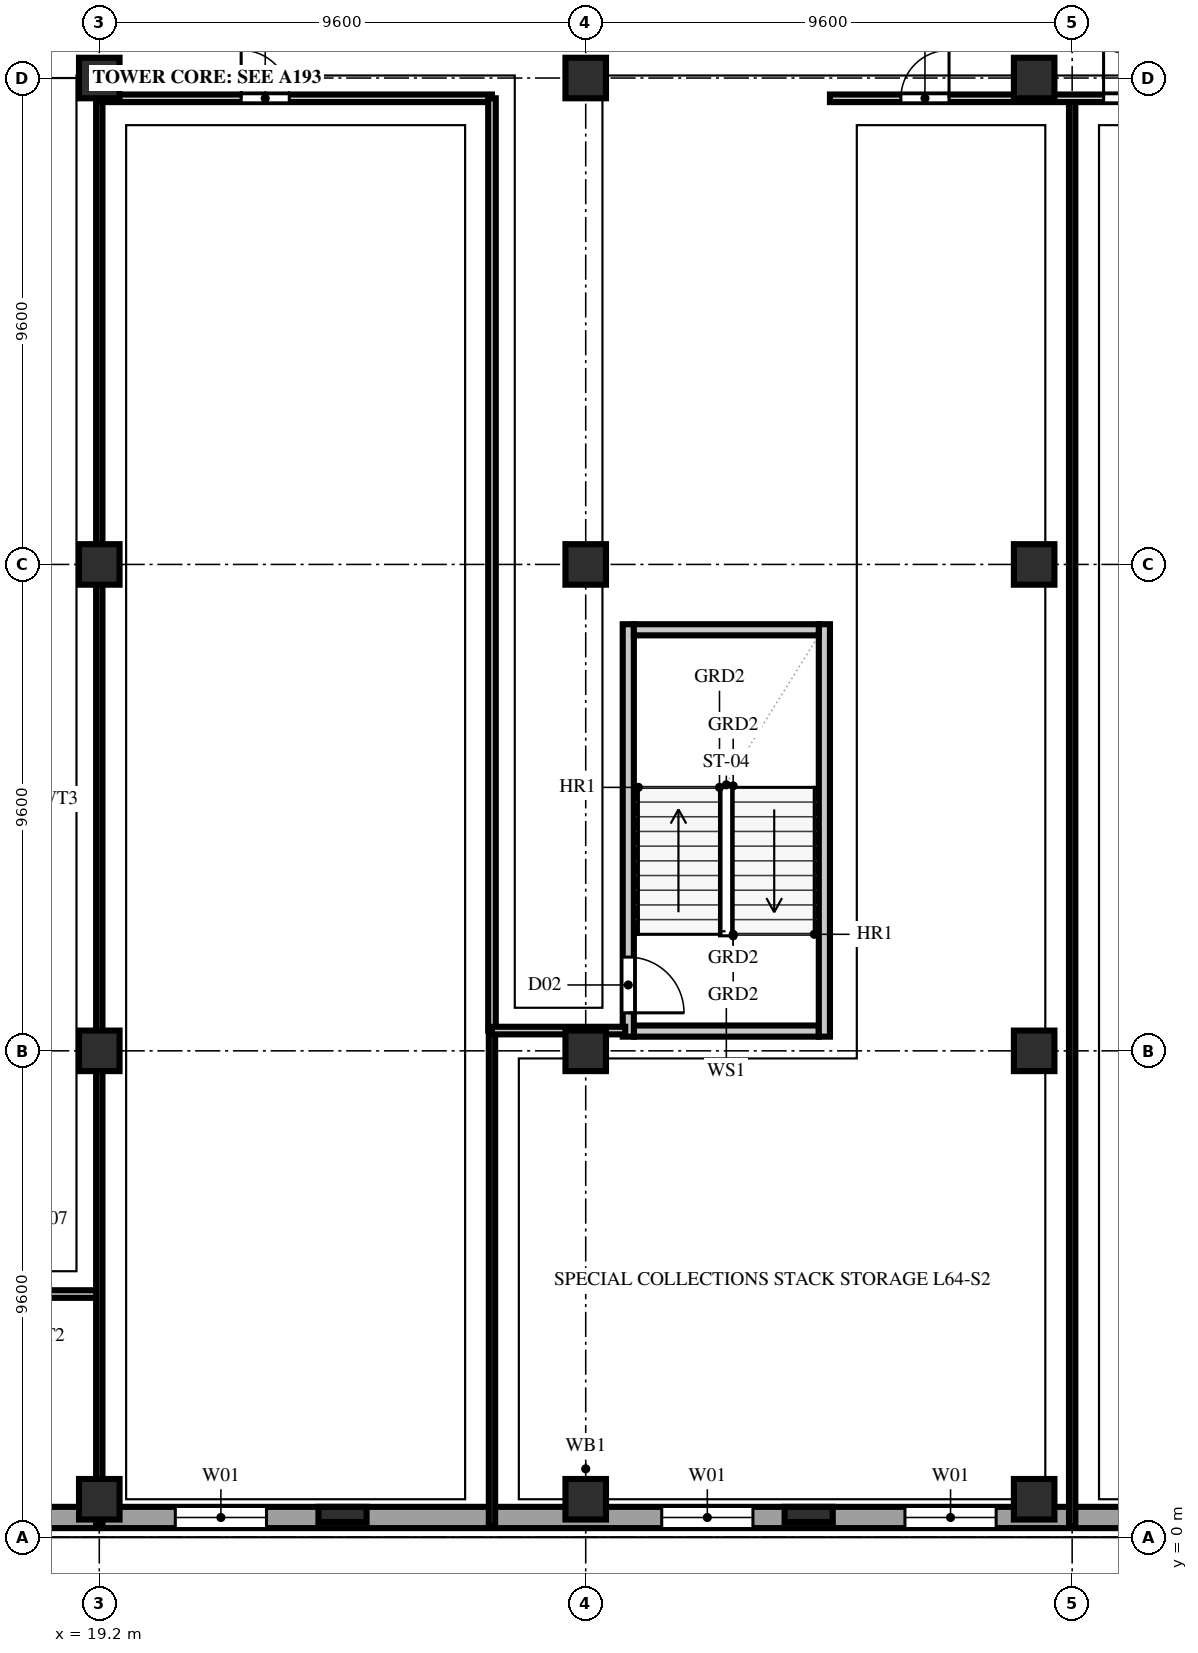
"""IFC4 building model, lengths in metres.
Left out: names, types, materials, properties, quantities, classifications, styles, units other than length and angle.
Written with IfcOpenShell. Run it as: python <this file> out.ifc"""

import sys

from ifc_helpers import new_model, si_unit, direction, frame, frame_2d, origin, origin_2d, place, context, subcontext, project, spatial, rectangle, extrude, element, fill, save


model = new_model("IFC4")
c1 = context("Model", 3, precision=1e-05, world=origin(), true_north=direction((0.0, 1.0)))
c2 = subcontext(c1, "Body", "Model", "MODEL_VIEW")
j1 = project(units=[si_unit("LENGTHUNIT", "METRE"), si_unit("PLANEANGLEUNIT", "RADIAN")], contexts=[c1])
p1 = place(None, origin())
s1 = spatial("IfcSite", under=j1, at=p1, CompositionType="ELEMENT")
p2 = place(p1, origin())
s2 = spatial("IfcBuilding", under=s1, at=p2, CompositionType="ELEMENT")
p3 = place(p2, frame((0.0, 0.0, 252.2)))
s3 = spatial("IfcBuildingStorey", under=s2, at=p3, CompositionType="ELEMENT", Elevation=252.2)
for number, where, z_axis, x_axis in (
    (1, (19.2, 0.75, 0.0), (0.0, 0.0, 1.0), (1.0, 0.0, 0.0)),
    (2, (19.2, 9.6, 0.0), (0.0, 0.0, 1.0), (1.0, 0.0, 0.0)),
    (3, (19.2, 19.2, 0.0), (0.0, 0.0, 1.0), (1.0, 0.0, 0.0)),
    (4, (19.2, 28.8, 0.0), (0.0, 0.0, 1.0), (1.0, 0.0, 0.0)),
    (5, (28.8, 0.75, 0.0), (0.0, 0.0, 1.0), (1.0, 0.0, 0.0)),
    (6, (28.8, 9.6, 0.0), (0.0, 0.0, 1.0), (1.0, 0.0, 0.0)),
    (7, (28.8, 19.2, 0.0), (0.0, 0.0, 1.0), (1.0, 0.0, 0.0)),
    (8, (28.8, 28.8, 0.0), (0.0, 0.0, 1.0), (1.0, 0.0, 0.0)),
    (9, (37.65, 0.75, 0.0), (0.0, 0.0, 1.0), (1.0, 0.0, 0.0)),
    (10, (37.65, 9.6, 0.0), (0.0, 0.0, 1.0), (1.0, 0.0, 0.0)),
    (11, (37.65, 19.2, 0.0), (0.0, 0.0, 1.0), (1.0, 0.0, 0.0)),
    (12, (37.65, 28.8, 0.0), (0.0, 0.0, 1.0), (1.0, 0.0, 0.0)),
):
    element("IfcColumn", number, at=place(p3, frame(where, z_axis=z_axis, x_axis=x_axis)), inside=s3, PredefinedType="COLUMN", context=c2, shape_type="SweptSolid", body=[
        extrude(rectangle(XDim=0.8, YDim=0.8, at=origin_2d()), origin(), (0.0, 0.0, 1.0), 3.8),
    ])
for number, where, z_axis, x_axis in (
    (13, (24.0, 0.45, 0.0), (0.0, 0.0, 1.0), (1.0, 0.0, 0.0)),
    (14, (33.2, 0.45, 0.0), (0.0, 0.0, 1.0), (1.0, 0.0, 0.0)),
):
    element("IfcColumn", number, at=place(p3, frame(where, z_axis=z_axis, x_axis=x_axis)), inside=s3, PredefinedType="PILASTER", context=c2, shape_type="SweptSolid", body=[
        extrude(rectangle(XDim=0.95, YDim=0.3, at=origin_2d()), origin(), (0.0, 0.0, 1.0), 3.8),
    ])
p4 = place(p3, frame((1.84, 0.39, 0.0), z_axis=(0.0, 0.0, 1.0), x_axis=(1.0, 0.0, 0.0)))
e15 = element("IfcWall", 15, at=p4, inside=s3, PredefinedType="SOLIDWALL", context=c2, shape_type="SweptSolid", body=[
    extrude(rectangle(XDim=53.92, YDim=0.42, at=frame_2d((26.96, 0.0))), origin(), (0.0, 0.0, 1.0), 3.48),
])
p5 = place(p4, frame((4.46, 0.0, 0.85)))
e16 = element("IfcOpeningElement", 16, at=p5, cuts=e15, PredefinedType="OPENING", context=c2, shape_type="SweptSolid", body=[
    extrude(rectangle(XDim=1.8, YDim=1.85, at=frame_2d((0.9, 0.925))), frame((0.0, 0.222, 0.0), z_axis=(0.0, -1.0, 0.0), x_axis=(1.0, 0.0, 0.0)), (0.0, 0.0, 1.0), 0.444),
])
p6 = place(p4, frame((9.26, 0.0, 0.85)))
e17 = element("IfcOpeningElement", 17, at=p6, cuts=e15, PredefinedType="OPENING", context=c2, shape_type="SweptSolid", body=[
    extrude(rectangle(XDim=1.8, YDim=1.85, at=frame_2d((0.9, 0.925))), frame((0.0, 0.222, 0.0), z_axis=(0.0, -1.0, 0.0), x_axis=(1.0, 0.0, 0.0)), (0.0, 0.0, 1.0), 0.444),
])
p7 = place(p4, frame((18.86, 0.0, 0.85)))
e18 = element("IfcOpeningElement", 18, at=p7, cuts=e15, PredefinedType="OPENING", context=c2, shape_type="SweptSolid", body=[
    extrude(rectangle(XDim=1.8, YDim=1.85, at=frame_2d((0.9, 0.925))), frame((0.0, 0.222, 0.0), z_axis=(0.0, -1.0, 0.0), x_axis=(1.0, 0.0, 0.0)), (0.0, 0.0, 1.0), 0.444),
])
p8 = place(p4, frame((28.46, 0.0, 0.85)))
e19 = element("IfcOpeningElement", 19, at=p8, cuts=e15, PredefinedType="OPENING", context=c2, shape_type="SweptSolid", body=[
    extrude(rectangle(XDim=1.8, YDim=1.85, at=frame_2d((0.9, 0.925))), frame((0.0, 0.222, 0.0), z_axis=(0.0, -1.0, 0.0), x_axis=(1.0, 0.0, 0.0)), (0.0, 0.0, 1.0), 0.444),
])
p9 = place(p4, frame((33.26, 0.0, 0.85)))
e20 = element("IfcOpeningElement", 20, at=p9, cuts=e15, PredefinedType="OPENING", context=c2, shape_type="SweptSolid", body=[
    extrude(rectangle(XDim=1.8, YDim=1.85, at=frame_2d((0.9, 0.925))), frame((0.0, 0.222, 0.0), z_axis=(0.0, -1.0, 0.0), x_axis=(1.0, 0.0, 0.0)), (0.0, 0.0, 1.0), 0.444),
])
p10 = place(p4, frame((38.06, 0.0, 0.85)))
e21 = element("IfcOpeningElement", 21, at=p10, cuts=e15, PredefinedType="OPENING", context=c2, shape_type="SweptSolid", body=[
    extrude(rectangle(XDim=1.8, YDim=1.85, at=frame_2d((0.9, 0.925))), frame((0.0, 0.222, 0.0), z_axis=(0.0, -1.0, 0.0), x_axis=(1.0, 0.0, 0.0)), (0.0, 0.0, 1.0), 0.444),
])
p11 = place(p4, frame((42.86, 0.0, 0.85)))
e22 = element("IfcOpeningElement", 22, at=p11, cuts=e15, PredefinedType="OPENING", context=c2, shape_type="SweptSolid", body=[
    extrude(rectangle(XDim=1.8, YDim=1.85, at=frame_2d((0.9, 0.925))), frame((0.0, 0.222, 0.0), z_axis=(0.0, -1.0, 0.0), x_axis=(1.0, 0.0, 0.0)), (0.0, 0.0, 1.0), 0.444),
])
p12 = place(p4, frame((47.66, 0.0, 0.85)))
e23 = element("IfcOpeningElement", 23, at=p12, cuts=e15, PredefinedType="OPENING", context=c2, shape_type="SweptSolid", body=[
    extrude(rectangle(XDim=1.8, YDim=1.85, at=frame_2d((0.9, 0.925))), frame((0.0, 0.222, 0.0), z_axis=(0.0, -1.0, 0.0), x_axis=(1.0, 0.0, 0.0)), (0.0, 0.0, 1.0), 0.444),
])
p13 = place(p3, frame((29.75, 9.99, 0.0), z_axis=(0.0, 0.0, 1.0), x_axis=(1.0, 0.0, 0.0)))
e24 = element("IfcWall", 24, at=p13, inside=s3, PredefinedType="SOLIDWALL", context=c2, shape_type="SweptSolid", body=[
    extrude(rectangle(XDim=3.65, YDim=0.22, at=frame_2d((1.825, 0.0))), origin(), (0.0, 0.0, 1.0), 3.48),
])
p14 = place(p3, frame((29.64, 9.88, 0.0), z_axis=(0.0, 0.0, 1.0), x_axis=(0.0, 1.0, 0.0)))
e25 = element("IfcWall", 25, at=p14, inside=s3, PredefinedType="SOLIDWALL", context=c2, shape_type="SweptSolid", body=[
    extrude(rectangle(XDim=8.14, YDim=0.22, at=frame_2d((4.07, 0.0))), origin(), (0.0, 0.0, 1.0), 3.48),
])
p15 = place(p14, frame((0.47, 0.0, 0.0)))
e26 = element("IfcOpeningElement", 26, at=p15, cuts=e25, PredefinedType="OPENING", context=c2, shape_type="SweptSolid", body=[
    extrude(rectangle(XDim=1.1, YDim=2.2, at=frame_2d((0.55, 1.1))), frame((0.0, 0.122, 0.0), z_axis=(0.0, -1.0, 0.0), x_axis=(1.0, 0.0, 0.0)), (0.0, 0.0, 1.0), 0.244),
])
p16 = place(p3, frame((33.51, 9.88, 0.0), z_axis=(0.0, 0.0, 1.0), x_axis=(0.0, 1.0, 0.0)))
e27 = element("IfcWall", 27, at=p16, inside=s3, PredefinedType="SOLIDWALL", context=c2, shape_type="SweptSolid", body=[
    extrude(rectangle(XDim=8.14, YDim=0.22, at=frame_2d((4.07, 0.0))), origin(), (0.0, 0.0, 1.0), 3.48),
])
p17 = place(p3, frame((29.75, 17.91, 0.0), z_axis=(0.0, 0.0, 1.0), x_axis=(1.0, 0.0, 0.0)))
e28 = element("IfcWall", 28, at=p17, inside=s3, PredefinedType="SOLIDWALL", context=c2, shape_type="SweptSolid", body=[
    extrude(rectangle(XDim=3.65, YDim=0.22, at=frame_2d((1.825, 0.0))), origin(), (0.0, 0.0, 1.0), 3.48),
])
p18 = place(p3, frame((17.05, 4.8, 0.0), z_axis=(0.0, 0.0, 1.0), x_axis=(1.0, 0.0, 0.0)))
e29 = element("IfcWall", 29, at=p18, inside=s3, PredefinedType="PARTITIONING", context=c2, shape_type="SweptSolid", body=[
    extrude(rectangle(XDim=2.15, YDim=0.15, at=frame_2d((1.075, 0.0))), origin(), (0.0, 0.0, 1.0), 3.48),
])
p19 = place(p3, frame((19.2, 0.22, 0.0), z_axis=(0.0, 0.0, 1.0), x_axis=(0.0, 1.0, 0.0)))
e30 = element("IfcWall", 30, at=p19, inside=s3, PredefinedType="PARTITIONING", context=c2, shape_type="SweptSolid", body=[
    extrude(rectangle(XDim=0.53, YDim=0.125, at=frame_2d((0.265, 0.0))), origin(), (0.0, 0.0, 1.0), 3.48),
])
p20 = place(p3, frame((19.2, 0.75, 0.0), z_axis=(0.0, 0.0, 1.0), x_axis=(0.0, 1.0, 0.0)))
e31 = element("IfcWall", 31, at=p20, inside=s3, PredefinedType="PARTITIONING", context=c2, shape_type="SweptSolid", body=[
    extrude(rectangle(XDim=27.65, YDim=0.125, at=frame_2d((13.825, 0.0))), origin(), (0.0, 0.0, 1.0), 2.863),
])
p21 = place(p3, frame((19.2, 28.4, 0.0), z_axis=(0.0, 0.0, 1.0), x_axis=(1.0, 0.0, 0.0)))
e32 = element("IfcWall", 32, at=p21, inside=s3, PredefinedType="PARTITIONING", context=c2, shape_type="SweptSolid", body=[
    extrude(rectangle(XDim=7.75, YDim=0.15, at=frame_2d((3.875, 0.0))), origin(), (0.0, 0.0, 1.0), 3.48),
])
p22 = place(p21, frame((2.8, 0.0, 0.0)))
e33 = element("IfcOpeningElement", 33, at=p22, cuts=e32, PredefinedType="OPENING", context=c2, shape_type="SweptSolid", body=[
    extrude(rectangle(XDim=0.95, YDim=2.15, at=frame_2d((0.475, 1.075))), frame((0.0, 0.087, 0.0), z_axis=(0.0, -1.0, 0.0), x_axis=(1.0, 0.0, 0.0)), (0.0, 0.0, 1.0), 0.174),
])
p23 = place(p3, frame((26.95, 0.22, 0.0), z_axis=(0.0, 0.0, 1.0), x_axis=(0.0, 1.0, 0.0)))
e34 = element("IfcWall", 34, at=p23, inside=s3, PredefinedType="PARTITIONING", context=c2, shape_type="SweptSolid", body=[
    extrude(rectangle(XDim=9.78, YDim=0.125, at=frame_2d((4.89, 0.0))), origin(), (0.0, 0.0, 1.0), 3.48),
])
p24 = place(p3, frame((26.95, 10.0, 0.0), z_axis=(0.0, 0.0, 1.0), x_axis=(0.0, 1.0, 0.0)))
e35 = element("IfcWall", 35, at=p24, inside=s3, PredefinedType="PARTITIONING", context=c2, shape_type="SweptSolid", body=[
    extrude(rectangle(XDim=18.4, YDim=0.15, at=frame_2d((9.2, 0.0))), origin(), (0.0, 0.0, 1.0), 3.48),
])
p25 = place(p3, frame((26.95, 10.0, 0.0), z_axis=(0.0, 0.0, 1.0), x_axis=(1.0, 0.0, 0.0)))
e36 = element("IfcWall", 36, at=p25, inside=s3, PredefinedType="PARTITIONING", context=c2, shape_type="SweptSolid", body=[
    extrude(rectangle(XDim=2.63, YDim=0.15, at=frame_2d((1.315, 0.0))), origin(), (0.0, 0.0, 1.0), 3.48),
])
p26 = place(p3, frame((38.4, 0.22, 0.0), z_axis=(0.0, 0.0, 1.0), x_axis=(0.0, 1.0, 0.0)))
e37 = element("IfcWall", 37, at=p26, inside=s3, PredefinedType="PARTITIONING", context=c2, shape_type="SweptSolid", body=[
    extrude(rectangle(XDim=28.18, YDim=0.125, at=frame_2d((14.09, 0.0))), origin(), (0.0, 0.0, 1.0), 3.48),
])
p27 = place(p3, frame((33.62, 28.4, 0.0), z_axis=(0.0, 0.0, 1.0), x_axis=(1.0, 0.0, 0.0)))
e38 = element("IfcWall", 38, at=p27, inside=s3, PredefinedType="PARTITIONING", context=c2, shape_type="SweptSolid", body=[
    extrude(rectangle(XDim=23.76, YDim=0.15, at=frame_2d((11.88, 0.0))), origin(), (0.0, 0.0, 1.0), 3.48),
])
p28 = place(p27, frame((1.4, 0.0, 0.0)))
e39 = element("IfcOpeningElement", 39, at=p28, cuts=e38, PredefinedType="OPENING", context=c2, shape_type="SweptSolid", body=[
    extrude(rectangle(XDim=0.95, YDim=2.15, at=frame_2d((0.475, 1.075))), frame((0.0, 0.087, 0.0), z_axis=(0.0, -1.0, 0.0), x_axis=(1.0, 0.0, 0.0)), (0.0, 0.0, 1.0), 0.174),
])
p29 = place(p27, frame((5.4, 0.0, 0.0)))
e40 = element("IfcOpeningElement", 40, at=p29, cuts=e38, PredefinedType="OPENING", context=c2, shape_type="SweptSolid", body=[
    extrude(rectangle(XDim=0.95, YDim=2.15, at=frame_2d((0.475, 1.075))), frame((0.0, 0.087, 0.0), z_axis=(0.0, -1.0, 0.0), x_axis=(1.0, 0.0, 0.0)), (0.0, 0.0, 1.0), 0.174),
])
p30 = place(p7, origin())
e41 = element("IfcWindow", 41, at=p30, inside=s3, PartitioningType="DOUBLE_PANEL_VERTICAL", PredefinedType="WINDOW", context=c2, shape_type="SweptSolid", body=[
    extrude(rectangle(XDim=1.8, YDim=1.85, at=frame_2d((0.9, 0.925))), frame((0.0, 0.11, 0.0), z_axis=(0.0, -1.0, 0.0), x_axis=(1.0, 0.0, 0.0)), (0.0, 0.0, 1.0), 0.06),
])
fill(e18, e41)
p31 = place(p8, origin())
e42 = element("IfcWindow", 42, at=p31, inside=s3, PartitioningType="DOUBLE_PANEL_VERTICAL", PredefinedType="WINDOW", context=c2, shape_type="SweptSolid", body=[
    extrude(rectangle(XDim=1.8, YDim=1.85, at=frame_2d((0.9, 0.925))), frame((0.0, 0.11, 0.0), z_axis=(0.0, -1.0, 0.0), x_axis=(1.0, 0.0, 0.0)), (0.0, 0.0, 1.0), 0.06),
])
fill(e19, e42)
p32 = place(p9, origin())
e43 = element("IfcWindow", 43, at=p32, inside=s3, PartitioningType="DOUBLE_PANEL_VERTICAL", PredefinedType="WINDOW", context=c2, shape_type="SweptSolid", body=[
    extrude(rectangle(XDim=1.8, YDim=1.85, at=frame_2d((0.9, 0.925))), frame((0.0, 0.11, 0.0), z_axis=(0.0, -1.0, 0.0), x_axis=(1.0, 0.0, 0.0)), (0.0, 0.0, 1.0), 0.06),
])
fill(e20, e43)
p33 = place(p15, frame((1.1, 0.0, 0.0), z_axis=(0.0, 0.0, 1.0), x_axis=(-1.0, 0.0, 0.0)))
e44 = element("IfcDoor", 44, at=p33, inside=s3, OperationType="SINGLE_SWING_RIGHT", PredefinedType="DOOR", context=c2, shape_type="SweptSolid", body=[
    extrude(rectangle(XDim=1.1, YDim=2.2, at=frame_2d((0.55, 1.1))), frame((0.0, 0.025, 0.0), z_axis=(0.0, -1.0, 0.0), x_axis=(1.0, 0.0, 0.0)), (0.0, 0.0, 1.0), 0.05),
])
fill(e26, e44)
p34 = place(p22, origin())
e45 = element("IfcDoor", 45, at=p34, inside=s3, OperationType="SINGLE_SWING_LEFT", PredefinedType="DOOR", context=c2, shape_type="SweptSolid", body=[
    extrude(rectangle(XDim=0.95, YDim=2.15, at=frame_2d((0.475, 1.075))), frame((0.0, 0.025, 0.0), z_axis=(0.0, -1.0, 0.0), x_axis=(1.0, 0.0, 0.0)), (0.0, 0.0, 1.0), 0.05),
])
fill(e33, e45)
p35 = place(p28, origin())
e46 = element("IfcDoor", 46, at=p35, inside=s3, OperationType="SINGLE_SWING_RIGHT", PredefinedType="DOOR", context=c2, shape_type="SweptSolid", body=[
    extrude(rectangle(XDim=0.95, YDim=2.15, at=frame_2d((0.475, 1.075))), frame((0.0, 0.025, 0.0), z_axis=(0.0, -1.0, 0.0), x_axis=(1.0, 0.0, 0.0)), (0.0, 0.0, 1.0), 0.05),
])
fill(e39, e46)
p36 = place(p29, origin())
e47 = element("IfcDoor", 47, at=p36, inside=s3, OperationType="SINGLE_SWING_LEFT", PredefinedType="DOOR", context=c2, shape_type="SweptSolid", body=[
    extrude(rectangle(XDim=0.95, YDim=2.15, at=frame_2d((0.475, 1.075))), frame((0.0, 0.025, 0.0), z_axis=(0.0, -1.0, 0.0), x_axis=(1.0, 0.0, 0.0)), (0.0, 0.0, 1.0), 0.05),
])
fill(e40, e47)
save(model, sys.argv[1])
